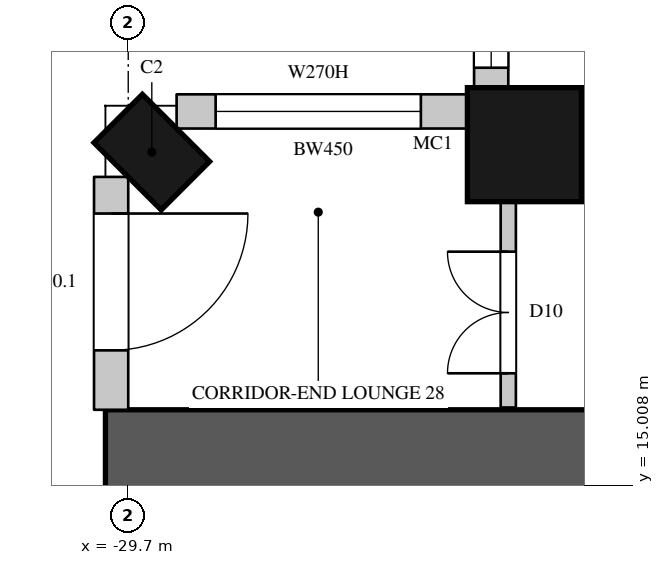
"""IFC4 building model, lengths in metres.
Left out: names, types, materials, properties, quantities, classifications, styles, units other than length and angle.
Written with IfcOpenShell. Run it as: python <this file> out.ifc"""

import sys

from ifc_helpers import new_model, si_unit, direction, frame, frame_2d, origin, origin_2d, place, context, subcontext, project, spatial, rectangle, circle, extrude, element, fill, save


model = new_model("IFC4")
c1 = context("Model", 3, precision=1e-05, world=origin(), true_north=direction((0.0, 1.0)))
c2 = subcontext(c1, "Body", "Model", "MODEL_VIEW")
j1 = project(units=[si_unit("LENGTHUNIT", "METRE"), si_unit("PLANEANGLEUNIT", "RADIAN")], contexts=[c1])
p1 = place(None, origin())
s1 = spatial("IfcSite", under=j1, at=p1, CompositionType="ELEMENT")
p2 = place(p1, origin())
s2 = spatial("IfcBuilding", under=s1, at=p2, CompositionType="ELEMENT")
p3 = place(p2, frame((0.0, 0.0, 131.1)))
s3 = spatial("IfcBuildingStorey", under=s2, at=p3, CompositionType="ELEMENT", Elevation=131.1)
p4 = place(p3, frame((-29.39, 19.39, 0.0), z_axis=(0.0, 0.0, 1.0), x_axis=(-0.707106781187, -0.707106781187, 0.0)))
e1 = element("IfcColumn", 1, at=p4, inside=s3, PredefinedType="COLUMN", context=c2, shape_type="SweptSolid", body=[
    extrude(rectangle(XDim=0.9, YDim=1.25, at=origin_2d()), origin(), (0.0, 0.0, 1.0), 3.6),
])
p5 = place(p3, frame((-24.488, 19.488, 0.0), z_axis=(0.0, 0.0, 1.0), x_axis=(1.0, 0.0, 0.0)))
e2 = element("IfcColumn", 2, at=p5, inside=s3, PredefinedType="COLUMN", context=c2, shape_type="SweptSolid", body=[
    extrude(circle(Radius=0.75, at=origin_2d()), origin(), (0.0, 0.0, 1.0), 3.6),
])
p6 = place(p3, frame((-29.925, 19.064, 0.0), z_axis=(0.0, 0.0, 1.0), x_axis=(0.0, -1.0, 0.0)))
e3 = element("IfcWall", 3, at=p6, inside=s3, PredefinedType="SOLIDWALL", context=c2, shape_type="SweptSolid", body=[
    extrude(rectangle(XDim=3.064, YDim=0.45, at=frame_2d((1.532, 0.0))), origin(), (0.0, 0.0, 1.0), 3.3),
])
p7 = place(p6, frame((0.482, 0.0, 0.0)))
e4 = element("IfcOpeningElement", 4, at=p7, cuts=e3, PredefinedType="OPENING", context=c2, shape_type="SweptSolid", body=[
    extrude(rectangle(XDim=1.8, YDim=2.4, at=frame_2d((0.9, 1.2))), frame((0.0, 0.235, 0.0), z_axis=(0.0, -1.0, 0.0), x_axis=(1.0, 0.0, 0.0)), (0.0, 0.0, 1.0), 0.47),
])
p8 = place(p3, frame((-24.925, 22.05, 0.0), z_axis=(0.0, 0.0, 1.0), x_axis=(0.0, -1.0, 0.0)))
e5 = element("IfcWall", 5, at=p8, inside=s3, PredefinedType="SOLIDWALL", context=c2, shape_type="SweptSolid", body=[
    extrude(rectangle(XDim=1.843, YDim=0.45, at=frame_2d((0.921, 0.0))), origin(), (0.0, 0.0, 1.0), 3.3),
])
p9 = place(p8, frame((0.35, 0.0, 1.05)))
e6 = element("IfcOpeningElement", 6, at=p9, cuts=e5, PredefinedType="OPENING", context=c2, shape_type="SweptSolid", body=[
    extrude(rectangle(XDim=1.2, YDim=2.0, at=frame_2d((0.6, 1.0))), frame((0.0, 0.235, 0.0), z_axis=(0.0, -1.0, 0.0), x_axis=(1.0, 0.0, 0.0)), (0.0, 0.0, 1.0), 0.47),
])
p10 = place(p3, frame((-25.207, 19.925, 0.0), z_axis=(0.0, 0.0, 1.0), x_axis=(-1.0, 0.0, 0.0)))
e7 = element("IfcWall", 7, at=p10, inside=s3, PredefinedType="SOLIDWALL", context=c2, shape_type="SweptSolid", body=[
    extrude(rectangle(XDim=3.857, YDim=0.45, at=frame_2d((1.928, 0.0))), origin(), (0.0, 0.0, 1.0), 3.3),
])
p11 = place(p10, frame((0.643, 0.0, 1.05)))
e8 = element("IfcOpeningElement", 8, at=p11, cuts=e7, PredefinedType="OPENING", context=c2, shape_type="SweptSolid", body=[
    extrude(rectangle(XDim=2.7, YDim=2.0, at=frame_2d((1.35, 1.0))), frame((0.0, 0.235, 0.0), z_axis=(0.0, -1.0, 0.0), x_axis=(1.0, 0.0, 0.0)), (0.0, 0.0, 1.0), 0.47),
])
p12 = place(p3, frame((-30.0, 15.4, 0.0), z_axis=(0.0, 0.0, 1.0), x_axis=(1.0, 0.0, 0.0)))
e9 = element("IfcWall", 9, at=p12, inside=s3, PredefinedType="SHEAR", context=c2, shape_type="SweptSolid", body=[
    extrude(rectangle(XDim=16.0, YDim=1.2, at=frame_2d((8.0, 0.0))), origin(), (0.0, 0.0, 1.0), 3.6),
])
p13 = place(p12, frame((13.4, 0.0, 0.0)))
e10 = element("IfcOpeningElement", 10, at=p13, cuts=e9, PredefinedType="OPENING", context=c2, shape_type="SweptSolid", body=[
    extrude(rectangle(XDim=1.5, YDim=2.4, at=frame_2d((0.75, 1.2))), frame((0.0, 0.61, 0.0), z_axis=(0.0, -1.0, 0.0), x_axis=(1.0, 0.0, 0.0)), (0.0, 0.0, 1.0), 1.22),
])
p14 = place(p3, frame((-24.7, 16.03, 0.0), z_axis=(0.0, 0.0, 1.0), x_axis=(0.0, 1.0, 0.0)))
e11 = element("IfcWall", 11, at=p14, inside=s3, PredefinedType="PARTITIONING", context=c2, shape_type="SweptSolid", body=[
    extrude(rectangle(XDim=2.722, YDim=0.2, at=frame_2d((1.361, 0.0))), origin(), (0.0, 0.0, 1.0), 3.3),
])
p15 = place(p14, frame((0.45, 0.0, 0.0)))
e12 = element("IfcOpeningElement", 12, at=p15, cuts=e11, PredefinedType="OPENING", context=c2, shape_type="SweptSolid", body=[
    extrude(rectangle(XDim=1.6, YDim=2.4, at=frame_2d((0.8, 1.2))), frame((0.0, 0.11, 0.0), z_axis=(0.0, -1.0, 0.0), x_axis=(1.0, 0.0, 0.0)), (0.0, 0.0, 1.0), 0.22),
])
p16 = place(p3, frame((-23.752, 19.7, 0.0), z_axis=(0.0, 0.0, 1.0), x_axis=(1.0, 0.0, 0.0)))
e13 = element("IfcWall", 13, at=p16, inside=s3, PredefinedType="PARTITIONING", context=c2, shape_type="SweptSolid", body=[
    extrude(rectangle(XDim=5.152, YDim=0.2, at=frame_2d((2.576, 0.0))), origin(), (0.0, 0.0, 1.0), 3.3),
])
p17 = place(p16, frame((0.85, 0.0, 0.0)))
e14 = element("IfcOpeningElement", 14, at=p17, cuts=e13, PredefinedType="OPENING", context=c2, shape_type="SweptSolid", body=[
    extrude(rectangle(XDim=0.9, YDim=2.2, at=frame_2d((0.45, 1.1))), frame((0.0, 0.11, 0.0), z_axis=(0.0, -1.0, 0.0), x_axis=(1.0, 0.0, 0.0)), (0.0, 0.0, 1.0), 0.22),
])
p18 = place(p16, frame((3.75, 0.0, 0.0)))
e15 = element("IfcOpeningElement", 15, at=p18, cuts=e13, PredefinedType="OPENING", context=c2, shape_type="SweptSolid", body=[
    extrude(rectangle(XDim=1.1, YDim=2.4, at=frame_2d((0.55, 1.2))), frame((0.0, 0.11, 0.0), z_axis=(0.0, -1.0, 0.0), x_axis=(1.0, 0.0, 0.0)), (0.0, 0.0, 1.0), 0.22),
])
p19 = place(p7, origin())
e16 = element("IfcDoor", 16, at=p19, inside=s3, OperationType="SLIDING_TO_LEFT", PredefinedType="DOOR", context=c2, shape_type="SweptSolid", body=[
    extrude(rectangle(XDim=1.8, YDim=2.4, at=frame_2d((0.9, 1.2))), frame((0.0, 0.13, 0.0), z_axis=(0.0, -1.0, 0.0), x_axis=(1.0, 0.0, 0.0)), (0.0, 0.0, 1.0), 0.05),
])
fill(e4, e16)
p20 = place(p9, origin())
e17 = element("IfcWindow", 17, at=p20, inside=s3, PartitioningType="SINGLE_PANEL", PredefinedType="WINDOW", context=c2, shape_type="SweptSolid", body=[
    extrude(rectangle(XDim=1.2, YDim=2.0, at=frame_2d((0.6, 1.0))), frame((0.0, 0.135, 0.0), z_axis=(0.0, -1.0, 0.0), x_axis=(1.0, 0.0, 0.0)), (0.0, 0.0, 1.0), 0.06),
])
fill(e6, e17)
p21 = place(p11, origin())
e18 = element("IfcWindow", 18, at=p21, inside=s3, PartitioningType="SINGLE_PANEL", PredefinedType="WINDOW", context=c2, shape_type="SweptSolid", body=[
    extrude(rectangle(XDim=2.7, YDim=2.0, at=frame_2d((1.35, 1.0))), frame((0.0, 0.135, 0.0), z_axis=(0.0, -1.0, 0.0), x_axis=(1.0, 0.0, 0.0)), (0.0, 0.0, 1.0), 0.06),
])
fill(e8, e18)
p22 = place(p15, origin())
e19 = element("IfcDoor", 19, at=p22, inside=s3, OperationType="DOUBLE_DOOR_SINGLE_SWING", PredefinedType="DOOR", context=c2, shape_type="SweptSolid", body=[
    extrude(rectangle(XDim=1.6, YDim=2.4, at=frame_2d((0.8, 1.2))), frame((0.0, 0.025, 0.0), z_axis=(0.0, -1.0, 0.0), x_axis=(1.0, 0.0, 0.0)), (0.0, 0.0, 1.0), 0.05),
])
fill(e12, e19)
save(model, sys.argv[1])
